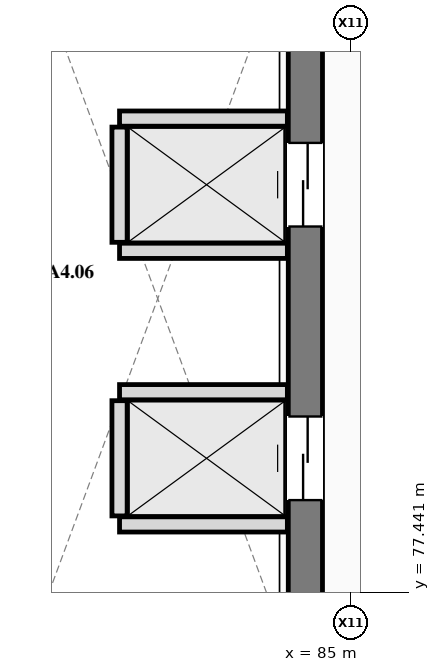
"""IFC4 building model, lengths in metres.
Left out: names, types, materials, properties, quantities, classifications, styles, units other than length and angle.
Written with IfcOpenShell. Run it as: python <this file> out.ifc"""

import sys

from ifc_helpers import new_model, si_unit, direction, frame, frame_2d, origin, place, context, subcontext, project, spatial, rectangle, extrude, element, fill, save


model = new_model("IFC4")
c1 = context("Model", 3, precision=1e-05, world=origin(), true_north=direction((0.0, 1.0)))
c2 = subcontext(c1, "Body", "Model", "MODEL_VIEW")
j1 = project(units=[si_unit("LENGTHUNIT", "METRE"), si_unit("PLANEANGLEUNIT", "RADIAN")], contexts=[c1])
p1 = place(None, origin())
s1 = spatial("IfcSite", under=j1, at=p1, CompositionType="ELEMENT")
p2 = place(p1, origin())
s2 = spatial("IfcBuilding", under=s1, at=p2, CompositionType="ELEMENT")
p3 = place(p2, frame((0.0, 0.0, 5.4)))
s3 = spatial("IfcBuildingStorey", under=s2, at=p3, CompositionType="ELEMENT", Elevation=5.4)
p4 = place(p3, frame((84.4, 76.625, 0.0), z_axis=(0.0, 0.0, 1.0), x_axis=(0.0, 1.0, 0.0)))
e1 = element("IfcWall", 1, at=p4, inside=s3, PredefinedType="SHEAR", context=c2, shape_type="SweptSolid", body=[
    extrude(rectangle(XDim=9.35, YDim=0.45, at=frame_2d((4.675, 0.0))), origin(), (0.0, 0.0, 1.0), 5.4),
])
p5 = place(p4, frame((2.025, 0.0, 0.0)))
e2 = element("IfcOpeningElement", 2, at=p5, cuts=e1, PredefinedType="OPENING", context=c2, shape_type="SweptSolid", body=[
    extrude(rectangle(XDim=1.1, YDim=2.2, at=frame_2d((0.55, 1.1))), frame((0.0, 0.235, 0.0), z_axis=(0.0, -1.0, 0.0), x_axis=(1.0, 0.0, 0.0)), (0.0, 0.0, 1.0), 0.47),
])
p6 = place(p4, frame((5.625, 0.0, 0.0)))
e3 = element("IfcOpeningElement", 3, at=p6, cuts=e1, PredefinedType="OPENING", context=c2, shape_type="SweptSolid", body=[
    extrude(rectangle(XDim=1.1, YDim=2.2, at=frame_2d((0.55, 1.1))), frame((0.0, 0.235, 0.0), z_axis=(0.0, -1.0, 0.0), x_axis=(1.0, 0.0, 0.0)), (0.0, 0.0, 1.0), 0.47),
])
for number, where, z_axis, x_axis in (
    (4, (81.955, 78.33, 0.0), (0.0, 0.0, 1.0), (1.0, 0.0, 0.0)),
    (5, (81.955, 80.07, 0.0), (0.0, 0.0, 1.0), (1.0, 0.0, 0.0)),
):
    element("IfcWall", number, at=place(p3, frame(where, z_axis=z_axis, x_axis=x_axis)), inside=s3, PredefinedType="PLUMBINGWALL", context=c2, shape_type="SweptSolid", body=[
        extrude(rectangle(XDim=2.208, YDim=0.2, at=frame_2d((1.104, 0.0))), origin(), (0.0, 0.0, 1.0), 5.095),
    ])
p7 = place(p3, frame((81.955, 78.442, 0.0), z_axis=(0.0, 0.0, 1.0), x_axis=(0.0, 1.0, 0.0)))
e6 = element("IfcWall", 6, at=p7, inside=s3, PredefinedType="PLUMBINGWALL", context=c2, shape_type="SweptSolid", body=[
    extrude(rectangle(XDim=1.516, YDim=0.2, at=frame_2d((0.758, 0.0))), origin(), (0.0, 0.0, 1.0), 5.095),
])
for number, where, z_axis, x_axis in (
    (7, (81.955, 81.93, 0.0), (0.0, 0.0, 1.0), (1.0, 0.0, 0.0)),
    (8, (81.955, 83.67, 0.0), (0.0, 0.0, 1.0), (1.0, 0.0, 0.0)),
):
    element("IfcWall", number, at=place(p3, frame(where, z_axis=z_axis, x_axis=x_axis)), inside=s3, PredefinedType="PLUMBINGWALL", context=c2, shape_type="SweptSolid", body=[
        extrude(rectangle(XDim=2.208, YDim=0.2, at=frame_2d((1.104, 0.0))), origin(), (0.0, 0.0, 1.0), 5.095),
    ])
p8 = place(p3, frame((81.955, 82.042, 0.0), z_axis=(0.0, 0.0, 1.0), x_axis=(0.0, 1.0, 0.0)))
e9 = element("IfcWall", 9, at=p8, inside=s3, PredefinedType="PLUMBINGWALL", context=c2, shape_type="SweptSolid", body=[
    extrude(rectangle(XDim=1.516, YDim=0.2, at=frame_2d((0.758, 0.0))), origin(), (0.0, 0.0, 1.0), 5.095),
])
p9 = place(p5, origin())
e10 = element("IfcDoor", 10, at=p9, inside=s3, OperationType="SLIDING_TO_LEFT", PredefinedType="DOOR", context=c2, shape_type="SweptSolid", body=[
    extrude(rectangle(XDim=1.1, YDim=2.2, at=frame_2d((0.55, 1.1))), frame((0.0, 0.025, 0.0), z_axis=(0.0, -1.0, 0.0), x_axis=(1.0, 0.0, 0.0)), (0.0, 0.0, 1.0), 0.05),
])
fill(e2, e10)
p10 = place(p6, origin())
e11 = element("IfcDoor", 11, at=p10, inside=s3, OperationType="SLIDING_TO_RIGHT", PredefinedType="DOOR", context=c2, shape_type="SweptSolid", body=[
    extrude(rectangle(XDim=1.1, YDim=2.2, at=frame_2d((0.55, 1.1))), frame((0.0, 0.025, 0.0), z_axis=(0.0, -1.0, 0.0), x_axis=(1.0, 0.0, 0.0)), (0.0, 0.0, 1.0), 0.05),
])
fill(e3, e11)
save(model, sys.argv[1])
